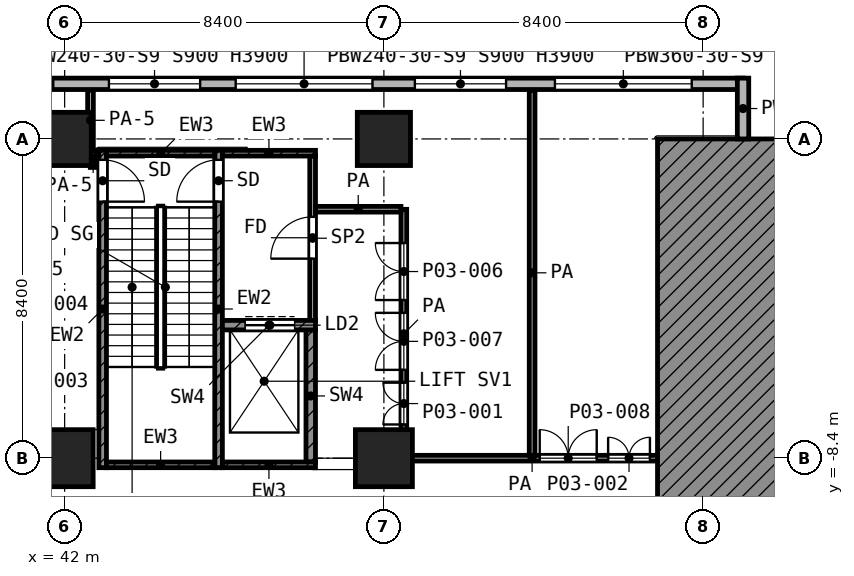
"""IFC4 building model, lengths in metres.
Left out: names, types, materials, properties, quantities, classifications, styles, units other than length and angle.
Written with IfcOpenShell. Run it as: python <this file> out.ifc"""

import sys

from ifc_helpers import new_model, si_unit, direction, frame, frame_2d, origin, origin_2d, place, context, subcontext, project, spatial, polyline, rectangle, outline, extrude, element, fill, save


model = new_model("IFC4")
c1 = context("Model", 3, precision=1e-05, world=origin(), true_north=direction((0.0, 1.0)))
c2 = subcontext(c1, "Body", "Model", "MODEL_VIEW")
j1 = project(units=[si_unit("LENGTHUNIT", "METRE"), si_unit("PLANEANGLEUNIT", "RADIAN")], contexts=[c1])
p1 = place(None, origin())
s1 = spatial("IfcSite", under=j1, at=p1, CompositionType="ELEMENT")
p2 = place(p1, origin())
s2 = spatial("IfcBuilding", under=s1, at=p2, CompositionType="ELEMENT")
p3 = place(p2, frame((0.0, 0.0, 12.6)))
s3 = spatial("IfcBuildingStorey", under=s2, at=p3, CompositionType="ELEMENT", Elevation=12.6)
for number, where, z_axis, x_axis in (
    (1, (42.0, 0.0, 0.0), (0.0, 0.0, 1.0), (1.0, 0.0, 0.0)),
    (2, (50.4, 0.0, 0.0), (0.0, 0.0, 1.0), (1.0, 0.0, 0.0)),
):
    element("IfcColumn", number, at=place(p3, frame(where, z_axis=z_axis, x_axis=x_axis)), inside=s3, PredefinedType="COLUMN", context=c2, shape_type="SweptSolid", body=[
        extrude(rectangle(XDim=1.4, YDim=1.4, at=origin_2d()), origin(), (0.0, 0.0, 1.0), 5.6),
    ])
for number, where, z_axis, x_axis in (
    (3, (42.0, -8.4, 0.0), (0.0, 0.0, 1.0), (1.0, 0.0, 0.0)),
    (4, (50.4, -8.4, 0.0), (0.0, 0.0, 1.0), (1.0, 0.0, 0.0)),
):
    element("IfcColumn", number, at=place(p3, frame(where, z_axis=z_axis, x_axis=x_axis)), inside=s3, PredefinedType="COLUMN", context=c2, shape_type="SweptSolid", body=[
        extrude(rectangle(XDim=1.5, YDim=1.5, at=origin_2d()), origin(), (0.0, 0.0, 1.0), 5.6),
    ])
p4 = place(p3, frame((0.0, 0.0, -12.6), z_axis=(0.0, -1.0, 0.0), x_axis=(1.0, 0.0, 0.0)))
e5 = element("IfcWall", 5, at=p4, inside=s3, PredefinedType="SHEAR", context=c2, shape_type="SweptSolid", body=[
    extrude(outline(polyline([(62.938, 18.2), (62.484, 17.583), (61.414, 15.591), (60.634, 13.468), (60.448, 12.6), (57.6, 12.6), (57.6, 18.2), (62.938, 18.2)])), origin(), (0.0, 0.0, 1.0), 33.6),
])
p5 = place(p3, frame((59.85, 0.0, 0.0), z_axis=(0.0, 0.0, 1.0), x_axis=(0.0, 1.0, 0.0)))
e6 = element("IfcWall", 6, at=p5, inside=s3, PredefinedType="SOLIDWALL", context=c2, shape_type="SweptSolid", body=[
    extrude(rectangle(XDim=1.6, YDim=0.3, at=frame_2d((0.8, 0.0))), origin(), (0.0, 0.0, 1.0), 5.25),
])
p6 = place(p3, frame((59.85, 1.45, 0.0), z_axis=(0.0, 0.0, 1.0), x_axis=(-1.0, 0.0, 0.0)))
e7 = element("IfcWall", 7, at=p6, inside=s3, PredefinedType="SOLIDWALL", context=c2, shape_type="SweptSolid", body=[
    extrude(rectangle(XDim=55.388, YDim=0.3, at=frame_2d((27.694, 0.0))), origin(), (0.0, 0.0, 1.0), 5.25),
])
p7 = place(p6, frame((1.35, 0.0, 0.9)))
e8 = element("IfcOpeningElement", 8, at=p7, cuts=e7, PredefinedType="OPENING", context=c2, shape_type="SweptSolid", body=[
    extrude(rectangle(XDim=3.6, YDim=3.0, at=frame_2d((1.8, 1.5))), frame((0.0, 0.16, 0.0), z_axis=(0.0, -1.0, 0.0), x_axis=(1.0, 0.0, 0.0)), (0.0, 0.0, 1.0), 0.32),
])
p8 = place(p6, frame((6.235, 0.0, 0.9)))
e9 = element("IfcOpeningElement", 9, at=p8, cuts=e7, PredefinedType="OPENING", context=c2, shape_type="SweptSolid", body=[
    extrude(rectangle(XDim=2.4, YDim=3.0, at=frame_2d((1.2, 1.5))), frame((0.0, 0.16, 0.0), z_axis=(0.0, -1.0, 0.0), x_axis=(1.0, 0.0, 0.0)), (0.0, 0.0, 1.0), 0.32),
])
p9 = place(p6, frame((9.75, 0.0, 0.9)))
e10 = element("IfcOpeningElement", 10, at=p9, cuts=e7, PredefinedType="OPENING", context=c2, shape_type="SweptSolid", body=[
    extrude(rectangle(XDim=3.6, YDim=3.0, at=frame_2d((1.8, 1.5))), frame((0.0, 0.16, 0.0), z_axis=(0.0, -1.0, 0.0), x_axis=(1.0, 0.0, 0.0)), (0.0, 0.0, 1.0), 0.32),
])
p10 = place(p6, frame((14.285, 0.0, 0.9)))
e11 = element("IfcOpeningElement", 11, at=p10, cuts=e7, PredefinedType="OPENING", context=c2, shape_type="SweptSolid", body=[
    extrude(rectangle(XDim=2.4, YDim=3.0, at=frame_2d((1.2, 1.5))), frame((0.0, 0.16, 0.0), z_axis=(0.0, -1.0, 0.0), x_axis=(1.0, 0.0, 0.0)), (0.0, 0.0, 1.0), 0.32),
])
p11 = place(p6, frame((18.15, 0.0, 0.9)))
e12 = element("IfcOpeningElement", 12, at=p11, cuts=e7, PredefinedType="OPENING", context=c2, shape_type="SweptSolid", body=[
    extrude(rectangle(XDim=3.6, YDim=3.0, at=frame_2d((1.8, 1.5))), frame((0.0, 0.16, 0.0), z_axis=(0.0, -1.0, 0.0), x_axis=(1.0, 0.0, 0.0)), (0.0, 0.0, 1.0), 0.32),
])
p12 = place(p6, frame((22.35, 0.0, 0.9)))
e13 = element("IfcOpeningElement", 13, at=p12, cuts=e7, PredefinedType="OPENING", context=c2, shape_type="SweptSolid", body=[
    extrude(rectangle(XDim=3.6, YDim=3.0, at=frame_2d((1.8, 1.5))), frame((0.0, 0.16, 0.0), z_axis=(0.0, -1.0, 0.0), x_axis=(1.0, 0.0, 0.0)), (0.0, 0.0, 1.0), 0.32),
])
p13 = place(p6, frame((26.55, 0.0, 0.9)))
e14 = element("IfcOpeningElement", 14, at=p13, cuts=e7, PredefinedType="OPENING", context=c2, shape_type="SweptSolid", body=[
    extrude(rectangle(XDim=3.6, YDim=3.0, at=frame_2d((1.8, 1.5))), frame((0.0, 0.16, 0.0), z_axis=(0.0, -1.0, 0.0), x_axis=(1.0, 0.0, 0.0)), (0.0, 0.0, 1.0), 0.32),
])
p14 = place(p6, frame((31.585, 0.0, 0.9)))
e15 = element("IfcOpeningElement", 15, at=p14, cuts=e7, PredefinedType="OPENING", context=c2, shape_type="SweptSolid", body=[
    extrude(rectangle(XDim=2.4, YDim=3.0, at=frame_2d((1.2, 1.5))), frame((0.0, 0.16, 0.0), z_axis=(0.0, -1.0, 0.0), x_axis=(1.0, 0.0, 0.0)), (0.0, 0.0, 1.0), 0.32),
])
p15 = place(p6, frame((34.95, 0.0, 0.9)))
e16 = element("IfcOpeningElement", 16, at=p15, cuts=e7, PredefinedType="OPENING", context=c2, shape_type="SweptSolid", body=[
    extrude(rectangle(XDim=3.6, YDim=3.0, at=frame_2d((1.8, 1.5))), frame((0.0, 0.16, 0.0), z_axis=(0.0, -1.0, 0.0), x_axis=(1.0, 0.0, 0.0)), (0.0, 0.0, 1.0), 0.32),
])
p16 = place(p6, frame((39.15, 0.0, 0.9)))
e17 = element("IfcOpeningElement", 17, at=p16, cuts=e7, PredefinedType="OPENING", context=c2, shape_type="SweptSolid", body=[
    extrude(rectangle(XDim=3.6, YDim=3.0, at=frame_2d((1.8, 1.5))), frame((0.0, 0.16, 0.0), z_axis=(0.0, -1.0, 0.0), x_axis=(1.0, 0.0, 0.0)), (0.0, 0.0, 1.0), 0.32),
])
p17 = place(p6, frame((43.35, 0.0, 0.9)))
e18 = element("IfcOpeningElement", 18, at=p17, cuts=e7, PredefinedType="OPENING", context=c2, shape_type="SweptSolid", body=[
    extrude(rectangle(XDim=3.6, YDim=3.0, at=frame_2d((1.8, 1.5))), frame((0.0, 0.16, 0.0), z_axis=(0.0, -1.0, 0.0), x_axis=(1.0, 0.0, 0.0)), (0.0, 0.0, 1.0), 0.32),
])
p18 = place(p6, frame((47.55, 0.0, 0.9)))
e19 = element("IfcOpeningElement", 19, at=p18, cuts=e7, PredefinedType="OPENING", context=c2, shape_type="SweptSolid", body=[
    extrude(rectangle(XDim=3.6, YDim=3.0, at=frame_2d((1.8, 1.5))), frame((0.0, 0.16, 0.0), z_axis=(0.0, -1.0, 0.0), x_axis=(1.0, 0.0, 0.0)), (0.0, 0.0, 1.0), 0.32),
])
p19 = place(p6, frame((52.25, 0.0, 0.9)))
e20 = element("IfcOpeningElement", 20, at=p19, cuts=e7, PredefinedType="OPENING", context=c2, shape_type="SweptSolid", body=[
    extrude(rectangle(XDim=2.4, YDim=3.0, at=frame_2d((1.2, 1.5))), frame((0.0, 0.16, 0.0), z_axis=(0.0, -1.0, 0.0), x_axis=(1.0, 0.0, 0.0)), (0.0, 0.0, 1.0), 0.32),
])
p20 = place(p3, frame((43.0, -8.65, 0.0), z_axis=(0.0, 0.0, 1.0), x_axis=(0.0, 1.0, 0.0)))
e21 = element("IfcWall", 21, at=p20, inside=s3, PredefinedType="SHEAR", context=c2, shape_type="SweptSolid", body=[
    extrude(rectangle(XDim=8.35, YDim=0.2, at=frame_2d((4.175, 0.0))), origin(), (0.0, 0.0, 1.0), 5.25),
])
p21 = place(p20, frame((7.0, 0.0, 0.0)))
e22 = element("IfcOpeningElement", 22, at=p21, cuts=e21, PredefinedType="OPENING", context=c2, shape_type="SweptSolid", body=[
    extrude(rectangle(XDim=1.1, YDim=2.1, at=frame_2d((0.55, 1.05))), frame((0.0, 0.11, 0.0), z_axis=(0.0, -1.0, 0.0), x_axis=(1.0, 0.0, 0.0)), (0.0, 0.0, 1.0), 0.22),
])
p22 = place(p3, frame((46.05, -8.65, 0.0), z_axis=(0.0, 0.0, 1.0), x_axis=(0.0, 1.0, 0.0)))
e23 = element("IfcWall", 23, at=p22, inside=s3, PredefinedType="SHEAR", context=c2, shape_type="SweptSolid", body=[
    extrude(rectangle(XDim=8.35, YDim=0.2, at=frame_2d((4.175, 0.0))), origin(), (0.0, 0.0, 1.0), 5.25),
])
p23 = place(p22, frame((7.0, 0.0, 0.0)))
e24 = element("IfcOpeningElement", 24, at=p23, cuts=e23, PredefinedType="OPENING", context=c2, shape_type="SweptSolid", body=[
    extrude(rectangle(XDim=1.1, YDim=2.1, at=frame_2d((0.55, 1.05))), frame((0.0, 0.11, 0.0), z_axis=(0.0, -1.0, 0.0), x_axis=(1.0, 0.0, 0.0)), (0.0, 0.0, 1.0), 0.22),
])
p24 = place(p3, frame((43.1, -0.375, 0.0), z_axis=(0.0, 0.0, 1.0), x_axis=(1.0, 0.0, 0.0)))
e25 = element("IfcWall", 25, at=p24, inside=s3, PredefinedType="SHEAR", context=c2, shape_type="SweptSolid", body=[
    extrude(rectangle(XDim=2.85, YDim=0.15, at=frame_2d((1.425, 0.0))), origin(), (0.0, 0.0, 1.0), 5.25),
])
p25 = place(p3, frame((46.15, -0.375, 0.0), z_axis=(0.0, 0.0, 1.0), x_axis=(1.0, 0.0, 0.0)))
e26 = element("IfcWall", 26, at=p25, inside=s3, PredefinedType="SHEAR", context=c2, shape_type="SweptSolid", body=[
    extrude(rectangle(XDim=2.45, YDim=0.15, at=frame_2d((1.225, 0.0))), origin(), (0.0, 0.0, 1.0), 5.25),
])
p26 = place(p3, frame((43.1, -8.575, 0.0), z_axis=(0.0, 0.0, 1.0), x_axis=(1.0, 0.0, 0.0)))
e27 = element("IfcWall", 27, at=p26, inside=s3, PredefinedType="SHEAR", context=c2, shape_type="SweptSolid", body=[
    extrude(rectangle(XDim=2.85, YDim=0.15, at=frame_2d((1.425, 0.0))), origin(), (0.0, 0.0, 1.0), 5.25),
])
p27 = place(p3, frame((46.15, -8.575, 0.0), z_axis=(0.0, 0.0, 1.0), x_axis=(1.0, 0.0, 0.0)))
e28 = element("IfcWall", 28, at=p27, inside=s3, PredefinedType="SHEAR", context=c2, shape_type="SweptSolid", body=[
    extrude(rectangle(XDim=2.45, YDim=0.15, at=frame_2d((1.225, 0.0))), origin(), (0.0, 0.0, 1.0), 5.25),
])
p28 = place(p3, frame((46.15, -4.9, 0.0), z_axis=(0.0, 0.0, 1.0), x_axis=(1.0, 0.0, 0.0)))
e29 = element("IfcWall", 29, at=p28, inside=s3, PredefinedType="SHEAR", context=c2, shape_type="SweptSolid", body=[
    extrude(rectangle(XDim=2.45, YDim=0.25, at=frame_2d((1.225, 0.0))), origin(), (0.0, 0.0, 1.0), 5.25),
])
p29 = place(p28, frame((0.6, 0.0, 0.0)))
e30 = element("IfcOpeningElement", 30, at=p29, cuts=e29, PredefinedType="OPENING", context=c2, shape_type="SweptSolid", body=[
    extrude(rectangle(XDim=1.3, YDim=2.1, at=frame_2d((0.65, 1.05))), frame((0.0, 0.135, 0.0), z_axis=(0.0, -1.0, 0.0), x_axis=(1.0, 0.0, 0.0)), (0.0, 0.0, 1.0), 0.27),
])
p30 = place(p3, frame((48.475, -8.5, 0.0), z_axis=(0.0, 0.0, 1.0), x_axis=(0.0, 1.0, 0.0)))
e31 = element("IfcWall", 31, at=p30, inside=s3, PredefinedType="SHEAR", context=c2, shape_type="SweptSolid", body=[
    extrude(rectangle(XDim=3.475, YDim=0.25, at=frame_2d((1.738, 0.0))), origin(), (0.0, 0.0, 1.0), 5.25),
])
p31 = place(p3, frame((48.525, -4.775, 0.0), z_axis=(0.0, 0.0, 1.0), x_axis=(0.0, 1.0, 0.0)))
e32 = element("IfcWall", 32, at=p31, inside=s3, PredefinedType="PARTITIONING", context=c2, shape_type="SweptSolid", body=[
    extrude(rectangle(XDim=4.325, YDim=0.15, at=frame_2d((2.163, 0.0))), origin(), (0.0, 0.0, 1.0), 5.25),
])
p32 = place(p31, frame((1.625, 0.0, 0.0)))
e33 = element("IfcOpeningElement", 33, at=p32, cuts=e32, PredefinedType="OPENING", context=c2, shape_type="SweptSolid", body=[
    extrude(rectangle(XDim=1.1, YDim=2.1, at=frame_2d((0.55, 1.05))), frame((0.0, 0.085, 0.0), z_axis=(0.0, -1.0, 0.0), x_axis=(1.0, 0.0, 0.0)), (0.0, 0.0, 1.0), 0.17),
])
p33 = place(p3, frame((51.0, -8.4, 0.0), z_axis=(0.0, 0.0, 1.0), x_axis=(1.0, 0.0, 0.0)))
e34 = element("IfcWall", 34, at=p33, inside=s3, PredefinedType="PARTITIONING", context=c2, shape_type="SweptSolid", body=[
    extrude(rectangle(XDim=6.6, YDim=0.15, at=frame_2d((3.3, 0.0))), origin(), (0.0, 0.0, 1.0), 5.25),
])
p34 = place(p33, frame((3.5, 0.0, 0.0)))
e35 = element("IfcOpeningElement", 35, at=p34, cuts=e34, PredefinedType="OPENING", context=c2, shape_type="SweptSolid", body=[
    extrude(rectangle(XDim=1.5, YDim=2.1, at=frame_2d((0.75, 1.05))), frame((0.0, 0.085, 0.0), z_axis=(0.0, -1.0, 0.0), x_axis=(1.0, 0.0, 0.0)), (0.0, 0.0, 1.0), 0.17),
])
p35 = place(p33, frame((5.3, 0.0, 0.0)))
e36 = element("IfcOpeningElement", 36, at=p35, cuts=e34, PredefinedType="OPENING", context=c2, shape_type="SweptSolid", body=[
    extrude(rectangle(XDim=1.1, YDim=2.1, at=frame_2d((0.55, 1.05))), frame((0.0, 0.085, 0.0), z_axis=(0.0, -1.0, 0.0), x_axis=(1.0, 0.0, 0.0)), (0.0, 0.0, 1.0), 0.17),
])
p36 = place(p3, frame((48.6, -1.85, 0.0), z_axis=(0.0, 0.0, 1.0), x_axis=(1.0, 0.0, 0.0)))
e37 = element("IfcWall", 37, at=p36, inside=s3, PredefinedType="PARTITIONING", context=c2, shape_type="SweptSolid", body=[
    extrude(rectangle(XDim=2.249, YDim=0.15, at=frame_2d((1.125, 0.0))), origin(), (0.0, 0.0, 1.0), 5.25),
])
p37 = place(p3, frame((42.68, -0.3, 0.0), z_axis=(0.0, 0.0, 1.0), x_axis=(0.0, 1.0, 0.0)))
e38 = element("IfcWall", 38, at=p37, inside=s3, PredefinedType="PARTITIONING", context=c2, shape_type="SweptSolid", body=[
    extrude(rectangle(XDim=1.58, YDim=0.15, at=frame_2d((0.79, 0.0))), origin(), (0.0, 0.0, 1.0), 3.85),
])
p38 = place(p3, frame((42.75, -0.75, 0.0), z_axis=(0.0, 0.0, 1.0), x_axis=(0.0, 1.0, 0.0)))
e39 = element("IfcWall", 39, at=p38, inside=s3, PredefinedType="PARTITIONING", context=c2, shape_type="SweptSolid", body=[
    extrude(rectangle(XDim=0.45, YDim=0.15, at=frame_2d((0.225, 0.0))), origin(), (0.0, 0.0, 1.0), 3.85),
])
p39 = place(p3, frame((50.925, -8.4, 0.0), z_axis=(0.0, 0.0, 1.0), x_axis=(0.0, 1.0, 0.0)))
e40 = element("IfcWall", 40, at=p39, inside=s3, PredefinedType="PARTITIONING", context=c2, shape_type="SweptSolid", body=[
    extrude(rectangle(XDim=6.548, YDim=0.15, at=frame_2d((3.274, 0.0))), origin(), (0.0, 0.0, 1.0), 5.25),
])
p40 = place(p39, frame((4.161, 0.0, 0.0)))
e41 = element("IfcOpeningElement", 41, at=p40, cuts=e40, PredefinedType="OPENING", context=c2, shape_type="SweptSolid", body=[
    extrude(rectangle(XDim=1.5, YDim=2.1, at=frame_2d((0.75, 1.05))), frame((0.0, 0.085, 0.0), z_axis=(0.0, -1.0, 0.0), x_axis=(1.0, 0.0, 0.0)), (0.0, 0.0, 1.0), 0.17),
])
p41 = place(p39, frame((2.324, 0.0, 0.0)))
e42 = element("IfcOpeningElement", 42, at=p41, cuts=e40, PredefinedType="OPENING", context=c2, shape_type="SweptSolid", body=[
    extrude(rectangle(XDim=1.5, YDim=2.1, at=frame_2d((0.75, 1.05))), frame((0.0, 0.085, 0.0), z_axis=(0.0, -1.0, 0.0), x_axis=(1.0, 0.0, 0.0)), (0.0, 0.0, 1.0), 0.17),
])
p42 = place(p39, frame((0.887, 0.0, 0.0)))
e43 = element("IfcOpeningElement", 43, at=p42, cuts=e40, PredefinedType="OPENING", context=c2, shape_type="SweptSolid", body=[
    extrude(rectangle(XDim=1.1, YDim=2.1, at=frame_2d((0.55, 1.05))), frame((0.0, 0.085, 0.0), z_axis=(0.0, -1.0, 0.0), x_axis=(1.0, 0.0, 0.0)), (0.0, 0.0, 1.0), 0.17),
])
p43 = place(p3, frame((54.3, -8.325, 0.0), z_axis=(0.0, 0.0, 1.0), x_axis=(0.0, 1.0, 0.0)))
e44 = element("IfcWall", 44, at=p43, inside=s3, PredefinedType="PARTITIONING", context=c2, shape_type="SweptSolid", body=[
    extrude(rectangle(XDim=9.605, YDim=0.15, at=frame_2d((4.802, 0.0))), origin(), (0.0, 0.0, 1.0), 5.25),
])
p44 = place(p7, origin())
e45 = element("IfcWindow", 45, at=p44, inside=s3, PartitioningType="SINGLE_PANEL", PredefinedType="WINDOW", context=c2, shape_type="SweptSolid", body=[
    extrude(rectangle(XDim=3.6, YDim=3.0, at=frame_2d((1.8, 1.5))), frame((0.0, 0.03, 0.0), z_axis=(0.0, -1.0, 0.0), x_axis=(1.0, 0.0, 0.0)), (0.0, 0.0, 1.0), 0.06),
])
fill(e8, e45)
p45 = place(p8, origin())
e46 = element("IfcWindow", 46, at=p45, inside=s3, PartitioningType="SINGLE_PANEL", PredefinedType="WINDOW", context=c2, shape_type="SweptSolid", body=[
    extrude(rectangle(XDim=2.4, YDim=3.0, at=frame_2d((1.2, 1.5))), frame((0.0, 0.03, 0.0), z_axis=(0.0, -1.0, 0.0), x_axis=(1.0, 0.0, 0.0)), (0.0, 0.0, 1.0), 0.06),
])
fill(e9, e46)
p46 = place(p9, origin())
e47 = element("IfcWindow", 47, at=p46, inside=s3, PartitioningType="SINGLE_PANEL", PredefinedType="WINDOW", context=c2, shape_type="SweptSolid", body=[
    extrude(rectangle(XDim=3.6, YDim=3.0, at=frame_2d((1.8, 1.5))), frame((0.0, 0.03, 0.0), z_axis=(0.0, -1.0, 0.0), x_axis=(1.0, 0.0, 0.0)), (0.0, 0.0, 1.0), 0.06),
])
fill(e10, e47)
p47 = place(p10, origin())
e48 = element("IfcWindow", 48, at=p47, inside=s3, PartitioningType="SINGLE_PANEL", PredefinedType="WINDOW", context=c2, shape_type="SweptSolid", body=[
    extrude(rectangle(XDim=2.4, YDim=3.0, at=frame_2d((1.2, 1.5))), frame((0.0, 0.03, 0.0), z_axis=(0.0, -1.0, 0.0), x_axis=(1.0, 0.0, 0.0)), (0.0, 0.0, 1.0), 0.06),
])
fill(e11, e48)
p48 = place(p11, origin())
e49 = element("IfcWindow", 49, at=p48, inside=s3, PartitioningType="SINGLE_PANEL", PredefinedType="WINDOW", context=c2, shape_type="SweptSolid", body=[
    extrude(rectangle(XDim=3.6, YDim=3.0, at=frame_2d((1.8, 1.5))), frame((0.0, 0.03, 0.0), z_axis=(0.0, -1.0, 0.0), x_axis=(1.0, 0.0, 0.0)), (0.0, 0.0, 1.0), 0.06),
])
fill(e12, e49)
p49 = place(p21, frame((1.1, 0.0, 0.0), z_axis=(0.0, 0.0, 1.0), x_axis=(-1.0, 0.0, 0.0)))
e50 = element("IfcDoor", 50, at=p49, inside=s3, OperationType="SINGLE_SWING_LEFT", PredefinedType="DOOR", context=c2, shape_type="SweptSolid", body=[
    extrude(rectangle(XDim=1.1, YDim=2.1, at=frame_2d((0.55, 1.05))), frame((0.0, 0.025, 0.0), z_axis=(0.0, -1.0, 0.0), x_axis=(1.0, 0.0, 0.0)), (0.0, 0.0, 1.0), 0.05),
])
fill(e22, e50)
p50 = place(p23, origin())
e51 = element("IfcDoor", 51, at=p50, inside=s3, OperationType="SINGLE_SWING_LEFT", PredefinedType="DOOR", context=c2, shape_type="SweptSolid", body=[
    extrude(rectangle(XDim=1.1, YDim=2.1, at=frame_2d((0.55, 1.05))), frame((0.0, 0.025, 0.0), z_axis=(0.0, -1.0, 0.0), x_axis=(1.0, 0.0, 0.0)), (0.0, 0.0, 1.0), 0.05),
])
fill(e24, e51)
p51 = place(p29, origin())
e52 = element("IfcDoor", 52, at=p51, inside=s3, OperationType="DOUBLE_DOOR_SLIDING", PredefinedType="DOOR", context=c2, shape_type="SweptSolid", body=[
    extrude(rectangle(XDim=1.3, YDim=2.1, at=frame_2d((0.65, 1.05))), frame((0.0, 0.025, 0.0), z_axis=(0.0, -1.0, 0.0), x_axis=(1.0, 0.0, 0.0)), (0.0, 0.0, 1.0), 0.05),
])
fill(e30, e52)
p52 = place(p32, origin())
e53 = element("IfcDoor", 53, at=p52, inside=s3, OperationType="SINGLE_SWING_LEFT", PredefinedType="DOOR", context=c2, shape_type="SweptSolid", body=[
    extrude(rectangle(XDim=1.1, YDim=2.1, at=frame_2d((0.55, 1.05))), frame((0.0, 0.025, 0.0), z_axis=(0.0, -1.0, 0.0), x_axis=(1.0, 0.0, 0.0)), (0.0, 0.0, 1.0), 0.05),
])
fill(e33, e53)
p53 = place(p40, origin())
e54 = element("IfcDoor", 54, at=p53, inside=s3, OperationType="DOUBLE_DOOR_SINGLE_SWING", PredefinedType="DOOR", context=c2, shape_type="SweptSolid", body=[
    extrude(rectangle(XDim=1.5, YDim=2.1, at=frame_2d((0.75, 1.05))), frame((0.0, 0.025, 0.0), z_axis=(0.0, -1.0, 0.0), x_axis=(1.0, 0.0, 0.0)), (0.0, 0.0, 1.0), 0.05),
])
fill(e41, e54)
p54 = place(p41, origin())
e55 = element("IfcDoor", 55, at=p54, inside=s3, OperationType="DOUBLE_DOOR_SINGLE_SWING", PredefinedType="DOOR", context=c2, shape_type="SweptSolid", body=[
    extrude(rectangle(XDim=1.5, YDim=2.1, at=frame_2d((0.75, 1.05))), frame((0.0, 0.025, 0.0), z_axis=(0.0, -1.0, 0.0), x_axis=(1.0, 0.0, 0.0)), (0.0, 0.0, 1.0), 0.05),
])
fill(e42, e55)
p55 = place(p42, origin())
e56 = element("IfcDoor", 56, at=p55, inside=s3, OperationType="DOUBLE_DOOR_SINGLE_SWING", PredefinedType="DOOR", context=c2, shape_type="SweptSolid", body=[
    extrude(rectangle(XDim=1.1, YDim=2.1, at=frame_2d((0.55, 1.05))), frame((0.0, 0.025, 0.0), z_axis=(0.0, -1.0, 0.0), x_axis=(1.0, 0.0, 0.0)), (0.0, 0.0, 1.0), 0.05),
])
fill(e43, e56)
p56 = place(p34, origin())
e57 = element("IfcDoor", 57, at=p56, inside=s3, OperationType="DOUBLE_DOOR_SINGLE_SWING", PredefinedType="DOOR", context=c2, shape_type="SweptSolid", body=[
    extrude(rectangle(XDim=1.5, YDim=2.1, at=frame_2d((0.75, 1.05))), frame((0.0, 0.025, 0.0), z_axis=(0.0, -1.0, 0.0), x_axis=(1.0, 0.0, 0.0)), (0.0, 0.0, 1.0), 0.05),
])
fill(e35, e57)
p57 = place(p35, origin())
e58 = element("IfcDoor", 58, at=p57, inside=s3, OperationType="DOUBLE_DOOR_SINGLE_SWING", PredefinedType="DOOR", context=c2, shape_type="SweptSolid", body=[
    extrude(rectangle(XDim=1.1, YDim=2.1, at=frame_2d((0.55, 1.05))), frame((0.0, 0.025, 0.0), z_axis=(0.0, -1.0, 0.0), x_axis=(1.0, 0.0, 0.0)), (0.0, 0.0, 1.0), 0.05),
])
fill(e36, e58)
save(model, sys.argv[1])
